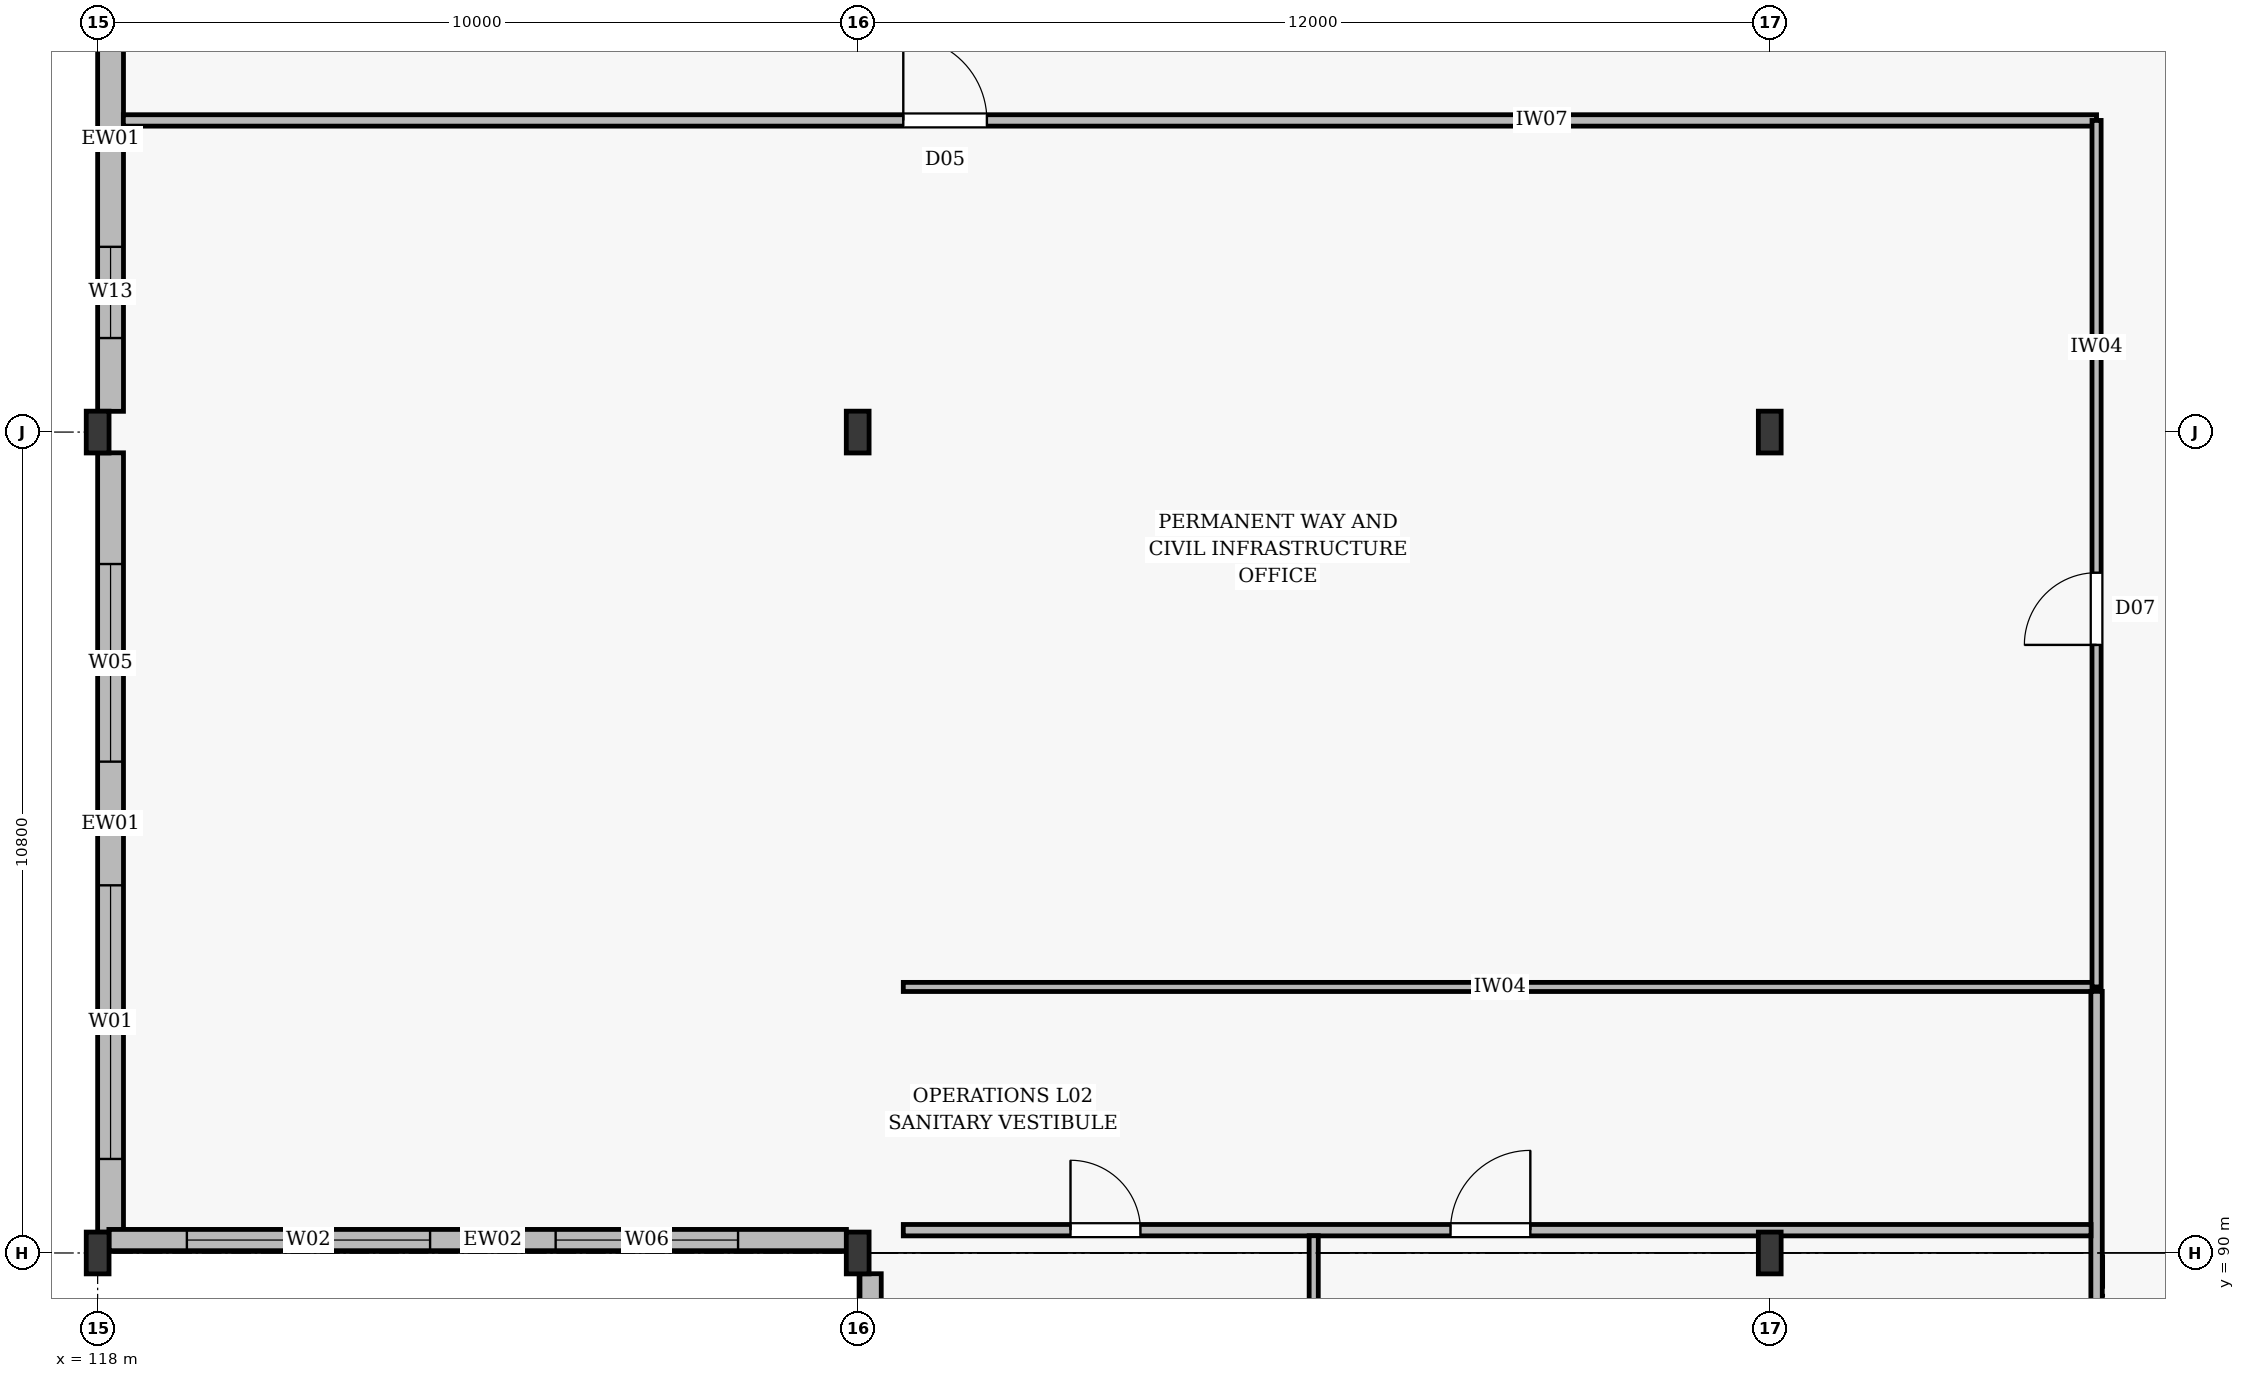
"""IFC4 building model, lengths in metres.
Left out: names, types, materials, properties, quantities, classifications, styles, units other than length and angle.
Written with IfcOpenShell. Run it as: python <this file> out.ifc"""

import sys

from ifc_helpers import new_model, si_unit, direction, frame, frame_2d, origin, origin_2d, place, context, subcontext, project, spatial, rectangle, i_section, extrude, element, fill, save


model = new_model("IFC4")
c1 = context("Model", 3, precision=1e-05, world=origin(), true_north=direction((0.0, 1.0)))
c2 = subcontext(c1, "Body", "Model", "MODEL_VIEW")
j1 = project(units=[si_unit("LENGTHUNIT", "METRE"), si_unit("PLANEANGLEUNIT", "RADIAN")], contexts=[c1])
p1 = place(None, origin())
s1 = spatial("IfcSite", under=j1, at=p1, CompositionType="ELEMENT")
p2 = place(p1, origin())
s2 = spatial("IfcBuilding", under=s1, at=p2, CompositionType="ELEMENT")
p3 = place(p2, frame((0.0, 0.0, 12.6)))
s3 = spatial("IfcBuildingStorey", under=s2, at=p3, CompositionType="ELEMENT", Elevation=12.6)
for number, where, z_axis, x_axis in (
    (1, (118.0, 90.0, 0.0), (0.0, 0.0, 1.0), (1.0, 0.0, 0.0)),
    (2, (118.0, 100.8, 0.0), (0.0, 0.0, 1.0), (1.0, 0.0, 0.0)),
    (3, (128.0, 90.0, 0.0), (0.0, 0.0, 1.0), (1.0, 0.0, 0.0)),
    (4, (128.0, 100.8, 0.0), (0.0, 0.0, 1.0), (1.0, 0.0, 0.0)),
    (5, (140.0, 90.0, 0.0), (0.0, 0.0, 1.0), (1.0, 0.0, 0.0)),
    (6, (140.0, 100.8, 0.0), (0.0, 0.0, 1.0), (1.0, 0.0, 0.0)),
):
    element("IfcColumn", number, at=place(p3, frame(where, z_axis=z_axis, x_axis=x_axis)), inside=s3, PredefinedType="COLUMN", context=c2, shape_type="SweptSolid", body=[
        extrude(i_section(OverallWidth=0.3, OverallDepth=0.55, WebThickness=0.015, FlangeThickness=0.029, at=origin_2d()), origin(), (0.0, 0.0, 1.0), 4.8),
    ])
p4 = place(p3, frame((118.17, 90.273, 0.0), z_axis=(0.0, 0.0, 1.0), x_axis=(0.0, 1.0, 0.0)))
e7 = element("IfcWall", 7, at=p4, inside=s3, PredefinedType="STANDARD", context=c2, shape_type="SweptSolid", body=[
    extrude(rectangle(XDim=10.254, YDim=0.34, at=frame_2d((5.127, 0.0))), origin(), (0.0, 0.0, 1.0), 3.9),
])
p5 = place(p4, frame((0.964, 0.0, 0.75)))
e8 = element("IfcOpeningElement", 8, at=p5, cuts=e7, PredefinedType="OPENING", context=c2, shape_type="SweptSolid", body=[
    extrude(rectangle(XDim=3.6, YDim=2.8, at=frame_2d((1.8, 1.4))), frame((0.0, 0.182, 0.0), z_axis=(0.0, -1.0, 0.0), x_axis=(1.0, 0.0, 0.0)), (0.0, 0.0, 1.0), 0.364),
])
p6 = place(p4, frame((6.191, 0.0, 0.75)))
e9 = element("IfcOpeningElement", 9, at=p6, cuts=e7, PredefinedType="OPENING", context=c2, shape_type="SweptSolid", body=[
    extrude(rectangle(XDim=2.6, YDim=2.4, at=frame_2d((1.3, 1.2))), frame((0.0, 0.182, 0.0), z_axis=(0.0, -1.0, 0.0), x_axis=(1.0, 0.0, 0.0)), (0.0, 0.0, 1.0), 0.364),
])
p7 = place(p3, frame((118.17, 101.073, 0.0), z_axis=(0.0, 0.0, 1.0), x_axis=(0.0, 1.0, 0.0)))
e10 = element("IfcWall", 10, at=p7, inside=s3, PredefinedType="STANDARD", context=c2, shape_type="SweptSolid", body=[
    extrude(rectangle(XDim=10.254, YDim=0.34, at=frame_2d((5.127, 0.0))), origin(), (0.0, 0.0, 1.0), 3.9),
])
p8 = place(p7, frame((0.964, 0.0, 0.75)))
e11 = element("IfcOpeningElement", 11, at=p8, cuts=e10, PredefinedType="OPENING", context=c2, shape_type="SweptSolid", body=[
    extrude(rectangle(XDim=1.2, YDim=1.8, at=frame_2d((0.6, 0.9))), frame((0.0, 0.182, 0.0), z_axis=(0.0, -1.0, 0.0), x_axis=(1.0, 0.0, 0.0)), (0.0, 0.0, 1.0), 0.364),
])
p9 = place(p7, frame((4.991, 0.0, 0.75)))
e12 = element("IfcOpeningElement", 12, at=p9, cuts=e10, PredefinedType="OPENING", context=c2, shape_type="SweptSolid", body=[
    extrude(rectangle(XDim=2.6, YDim=2.4, at=frame_2d((1.3, 1.2))), frame((0.0, 0.182, 0.0), z_axis=(0.0, -1.0, 0.0), x_axis=(1.0, 0.0, 0.0)), (0.0, 0.0, 1.0), 0.364),
])
p10 = place(p3, frame((118.148, 90.17, 0.0), z_axis=(0.0, 0.0, 1.0), x_axis=(1.0, 0.0, 0.0)))
e13 = element("IfcWall", 13, at=p10, inside=s3, PredefinedType="STANDARD", context=c2, shape_type="SweptSolid", body=[
    extrude(rectangle(XDim=9.704, YDim=0.28, at=frame_2d((4.852, 0.0))), origin(), (0.0, 0.0, 1.0), 3.9),
])
p11 = place(p10, frame((1.026, 0.0, 0.75)))
e14 = element("IfcOpeningElement", 14, at=p11, cuts=e13, PredefinedType="OPENING", context=c2, shape_type="SweptSolid", body=[
    extrude(rectangle(XDim=3.2, YDim=2.8, at=frame_2d((1.6, 1.4))), frame((0.0, 0.152, 0.0), z_axis=(0.0, -1.0, 0.0), x_axis=(1.0, 0.0, 0.0)), (0.0, 0.0, 1.0), 0.304),
])
p12 = place(p10, frame((5.878, 0.0, 0.75)))
e15 = element("IfcOpeningElement", 15, at=p12, cuts=e13, PredefinedType="OPENING", context=c2, shape_type="SweptSolid", body=[
    extrude(rectangle(XDim=2.4, YDim=2.4, at=frame_2d((1.2, 1.2))), frame((0.0, 0.152, 0.0), z_axis=(0.0, -1.0, 0.0), x_axis=(1.0, 0.0, 0.0)), (0.0, 0.0, 1.0), 0.304),
])
p13 = place(p3, frame((128.17, 79.473, 0.0), z_axis=(0.0, 0.0, 1.0), x_axis=(0.0, 1.0, 0.0)))
e16 = element("IfcWall", 16, at=p13, inside=s3, PredefinedType="STANDARD", context=c2, shape_type="SweptSolid", body=[
    extrude(rectangle(XDim=10.254, YDim=0.28, at=frame_2d((5.127, 0.0))), origin(), (0.0, 0.0, 1.0), 3.9),
])
p14 = place(p13, frame((1.664, 0.0, 0.75)))
e17 = element("IfcOpeningElement", 17, at=p14, cuts=e16, PredefinedType="OPENING", context=c2, shape_type="SweptSolid", body=[
    extrude(rectangle(XDim=2.2, YDim=2.2, at=frame_2d((1.1, 1.1))), frame((0.0, 0.152, 0.0), z_axis=(0.0, -1.0, 0.0), x_axis=(1.0, 0.0, 0.0)), (0.0, 0.0, 1.0), 0.304),
])
p15 = place(p13, frame((6.891, 0.0, 1.05)))
e18 = element("IfcOpeningElement", 18, at=p15, cuts=e16, PredefinedType="OPENING", context=c2, shape_type="SweptSolid", body=[
    extrude(rectangle(XDim=1.2, YDim=0.9, at=frame_2d((0.6, 0.45))), frame((0.0, 0.152, 0.0), z_axis=(0.0, -1.0, 0.0), x_axis=(1.0, 0.0, 0.0)), (0.0, 0.0, 1.0), 0.304),
])
p16 = place(p3, frame((118.338, 104.9, 0.0), z_axis=(0.0, 0.0, 1.0), x_axis=(1.0, 0.0, 0.0)))
e19 = element("IfcWall", 19, at=p16, inside=s3, PredefinedType="PARTITIONING", context=c2, shape_type="SweptSolid", body=[
    extrude(rectangle(XDim=25.962, YDim=0.15, at=frame_2d((12.981, 0.0))), origin(), (0.0, 0.0, 1.0), 4.09),
])
p17 = place(p16, frame((10.262, 0.0, 0.005)))
e20 = element("IfcOpeningElement", 20, at=p17, cuts=e19, PredefinedType="OPENING", context=c2, shape_type="SweptSolid", body=[
    extrude(rectangle(XDim=1.1, YDim=2.1, at=frame_2d((0.55, 1.05))), frame((0.0, 0.087, 0.0), z_axis=(0.0, -1.0, 0.0), x_axis=(1.0, 0.0, 0.0)), (0.0, 0.0, 1.0), 0.174),
])
p18 = place(p3, frame((128.6, 93.5, 0.0), z_axis=(0.0, 0.0, 1.0), x_axis=(1.0, 0.0, 0.0)))
e21 = element("IfcWall", 21, at=p18, inside=s3, PredefinedType="PARTITIONING", context=c2, shape_type="SweptSolid", body=[
    extrude(rectangle(XDim=15.7, YDim=0.12, at=frame_2d((7.85, 0.0))), origin(), (0.0, 0.0, 1.0), 4.09),
])
p19 = place(p3, frame((144.3, 93.5, 0.0), z_axis=(0.0, 0.0, 1.0), x_axis=(0.0, 1.0, 0.0)))
e22 = element("IfcWall", 22, at=p19, inside=s3, PredefinedType="PARTITIONING", context=c2, shape_type="SweptSolid", body=[
    extrude(rectangle(XDim=11.4, YDim=0.12, at=frame_2d((5.7, 0.0))), origin(), (0.0, 0.0, 1.0), 3.99),
])
p20 = place(p19, frame((4.5, 0.0, 0.005)))
e23 = element("IfcOpeningElement", 23, at=p20, cuts=e22, PredefinedType="OPENING", context=c2, shape_type="SweptSolid", body=[
    extrude(rectangle(XDim=0.95, YDim=2.1, at=frame_2d((0.475, 1.05))), frame((0.0, 0.072, 0.0), z_axis=(0.0, -1.0, 0.0), x_axis=(1.0, 0.0, 0.0)), (0.0, 0.0, 1.0), 0.144),
])
p21 = place(p3, frame((144.3, 79.478, 0.0), z_axis=(0.0, 0.0, 1.0), x_axis=(0.0, 1.0, 0.0)))
e24 = element("IfcWall", 24, at=p21, inside=s3, PredefinedType="PARTITIONING", context=c2, shape_type="SweptSolid", body=[
    extrude(rectangle(XDim=13.964, YDim=0.15, at=frame_2d((6.982, 0.0))), origin(), (0.0, 0.0, 1.0), 3.99),
])
p22 = place(p3, frame((128.6, 90.3, 0.0), z_axis=(0.0, 0.0, 1.0), x_axis=(1.0, 0.0, 0.0)))
e25 = element("IfcWall", 25, at=p22, inside=s3, PredefinedType="PARTITIONING", context=c2, shape_type="SweptSolid", body=[
    extrude(rectangle(XDim=15.627, YDim=0.15, at=frame_2d((7.813, 0.0))), origin(), (0.0, 0.0, 1.0), 3.99),
])
p23 = place(p22, frame((2.2, 0.0, 0.005)))
e26 = element("IfcOpeningElement", 26, at=p23, cuts=e25, PredefinedType="OPENING", context=c2, shape_type="SweptSolid", body=[
    extrude(rectangle(XDim=0.92, YDim=2.12, at=frame_2d((0.46, 1.06))), frame((0.0, 0.087, 0.0), z_axis=(0.0, -1.0, 0.0), x_axis=(1.0, 0.0, 0.0)), (0.0, 0.0, 1.0), 0.174),
])
p24 = place(p22, frame((7.2, 0.0, 0.005)))
e27 = element("IfcOpeningElement", 27, at=p24, cuts=e25, PredefinedType="OPENING", context=c2, shape_type="SweptSolid", body=[
    extrude(rectangle(XDim=1.05, YDim=2.15, at=frame_2d((0.525, 1.075))), frame((0.0, 0.087, 0.0), z_axis=(0.0, -1.0, 0.0), x_axis=(1.0, 0.0, 0.0)), (0.0, 0.0, 1.0), 0.174),
])
p25 = place(p3, frame((134.0, 79.478, 0.0), z_axis=(0.0, 0.0, 1.0), x_axis=(0.0, 1.0, 0.0)))
e28 = element("IfcWall", 28, at=p25, inside=s3, PredefinedType="PARTITIONING", context=c2, shape_type="SweptSolid", body=[
    extrude(rectangle(XDim=10.749, YDim=0.12, at=frame_2d((5.375, 0.0))), origin(), (0.0, 0.0, 1.0), 4.09),
])
p26 = place(p5, origin())
e29 = element("IfcWindow", 29, at=p26, inside=s3, PartitioningType="DOUBLE_PANEL_VERTICAL", PredefinedType="WINDOW", context=c2, shape_type="SweptSolid", body=[
    extrude(rectangle(XDim=3.6, YDim=2.8, at=frame_2d((1.8, 1.4))), frame((0.0, 0.03, 0.0), z_axis=(0.0, -1.0, 0.0), x_axis=(1.0, 0.0, 0.0)), (0.0, 0.0, 1.0), 0.06),
])
fill(e8, e29)
p27 = place(p6, origin())
e30 = element("IfcWindow", 30, at=p27, inside=s3, PartitioningType="DOUBLE_PANEL_VERTICAL", PredefinedType="WINDOW", context=c2, shape_type="SweptSolid", body=[
    extrude(rectangle(XDim=2.6, YDim=2.4, at=frame_2d((1.3, 1.2))), frame((0.0, 0.03, 0.0), z_axis=(0.0, -1.0, 0.0), x_axis=(1.0, 0.0, 0.0)), (0.0, 0.0, 1.0), 0.06),
])
fill(e9, e30)
p28 = place(p8, origin())
e31 = element("IfcWindow", 31, at=p28, inside=s3, PartitioningType="DOUBLE_PANEL_VERTICAL", PredefinedType="WINDOW", context=c2, shape_type="SweptSolid", body=[
    extrude(rectangle(XDim=1.2, YDim=1.8, at=frame_2d((0.6, 0.9))), frame((0.0, 0.03, 0.0), z_axis=(0.0, -1.0, 0.0), x_axis=(1.0, 0.0, 0.0)), (0.0, 0.0, 1.0), 0.06),
])
fill(e11, e31)
p29 = place(p11, origin())
e32 = element("IfcWindow", 32, at=p29, inside=s3, PartitioningType="DOUBLE_PANEL_VERTICAL", PredefinedType="WINDOW", context=c2, shape_type="SweptSolid", body=[
    extrude(rectangle(XDim=3.2, YDim=2.8, at=frame_2d((1.6, 1.4))), frame((0.0, 0.03, 0.0), z_axis=(0.0, -1.0, 0.0), x_axis=(1.0, 0.0, 0.0)), (0.0, 0.0, 1.0), 0.06),
])
fill(e14, e32)
p30 = place(p12, origin())
e33 = element("IfcWindow", 33, at=p30, inside=s3, PartitioningType="DOUBLE_PANEL_VERTICAL", PredefinedType="WINDOW", context=c2, shape_type="SweptSolid", body=[
    extrude(rectangle(XDim=2.4, YDim=2.4, at=frame_2d((1.2, 1.2))), frame((0.0, 0.03, 0.0), z_axis=(0.0, -1.0, 0.0), x_axis=(1.0, 0.0, 0.0)), (0.0, 0.0, 1.0), 0.06),
])
fill(e15, e33)
p31 = place(p17, origin())
e34 = element("IfcDoor", 34, at=p31, inside=s3, OperationType="SINGLE_SWING_LEFT", PredefinedType="DOOR", context=c2, shape_type="SweptSolid", body=[
    extrude(rectangle(XDim=1.1, YDim=2.1, at=frame_2d((0.55, 1.05))), frame((0.0, 0.025, 0.0), z_axis=(0.0, -1.0, 0.0), x_axis=(1.0, 0.0, 0.0)), (0.0, 0.0, 1.0), 0.05),
])
fill(e20, e34)
p32 = place(p20, origin())
e35 = element("IfcDoor", 35, at=p32, inside=s3, OperationType="SINGLE_SWING_LEFT", PredefinedType="DOOR", context=c2, shape_type="SweptSolid", body=[
    extrude(rectangle(XDim=0.95, YDim=2.1, at=frame_2d((0.475, 1.05))), frame((0.0, 0.025, 0.0), z_axis=(0.0, -1.0, 0.0), x_axis=(1.0, 0.0, 0.0)), (0.0, 0.0, 1.0), 0.05),
])
fill(e23, e35)
p33 = place(p23, origin())
e36 = element("IfcDoor", 36, at=p33, inside=s3, OperationType="SINGLE_SWING_LEFT", PredefinedType="DOOR", context=c2, shape_type="SweptSolid", body=[
    extrude(rectangle(XDim=0.92, YDim=2.12, at=frame_2d((0.46, 1.06))), frame((0.0, 0.025, 0.0), z_axis=(0.0, -1.0, 0.0), x_axis=(1.0, 0.0, 0.0)), (0.0, 0.0, 1.0), 0.05),
])
fill(e26, e36)
p34 = place(p24, origin())
e37 = element("IfcDoor", 37, at=p34, inside=s3, OperationType="SINGLE_SWING_RIGHT", PredefinedType="DOOR", context=c2, shape_type="SweptSolid", body=[
    extrude(rectangle(XDim=1.05, YDim=2.15, at=frame_2d((0.525, 1.075))), frame((0.0, 0.025, 0.0), z_axis=(0.0, -1.0, 0.0), x_axis=(1.0, 0.0, 0.0)), (0.0, 0.0, 1.0), 0.05),
])
fill(e27, e37)
save(model, sys.argv[1])
